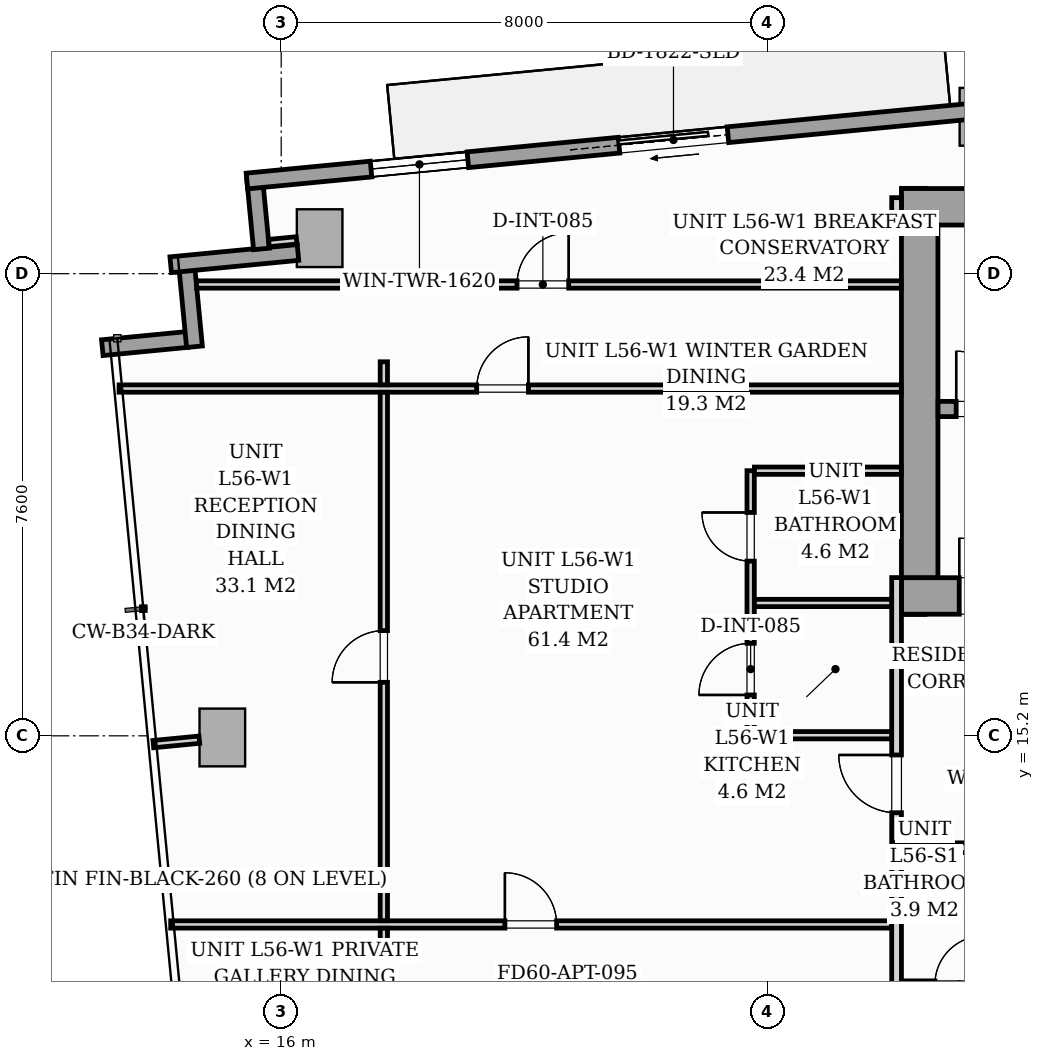
"""IFC4 building model, lengths in metres.
Left out: names, types, materials, properties, quantities, classifications, styles, units other than length and angle.
Written with IfcOpenShell. Run it as: python <this file> out.ifc"""

import sys

from ifc_helpers import new_model, si_unit, direction, frame, frame_2d, origin, origin_2d, place, context, subcontext, project, spatial, rectangle, i_section, extrude, source, transform, mapped, element, fill, save


model = new_model("IFC4")
c1 = context("Model", 3, precision=1e-05, world=origin(), true_north=direction((0.0, 1.0)))
c2 = subcontext(c1, "Body", "Model", "MODEL_VIEW")
j1 = project(units=[si_unit("LENGTHUNIT", "METRE"), si_unit("PLANEANGLEUNIT", "RADIAN")], contexts=[c1])
p1 = place(None, origin())
s1 = spatial("IfcSite", under=j1, at=p1, CompositionType="ELEMENT")
p2 = place(p1, origin())
s2 = spatial("IfcBuilding", under=s1, at=p2, CompositionType="ELEMENT")
p3 = place(p2, frame((0.0, 0.0, 195.4)))
s3 = spatial("IfcBuildingStorey", under=s2, at=p3, CompositionType="ELEMENT", Elevation=195.4)
m1 = source(origin(), c2, "Body", "SweptSolid", [
    extrude(i_section(OverallWidth=0.416, OverallDepth=0.446, WebThickness=0.039, FlangeThickness=0.063, FilletRadius=0.018, at=origin_2d()), origin(), (0.0, 0.0, 1.0), 3.196),
])
for number, where, z_axis, x_axis in (
    (1, (26.4, 17.4, 0.002), (0.0, 0.0, 1.0), (1.0, 0.0, 0.0)),
    (2, (26.4, 24.0, 0.002), (0.0, 0.0, 1.0), (1.0, 0.0, 0.0)),
):
    element("IfcColumn", number, at=place(p3, frame(where, z_axis=z_axis, x_axis=x_axis)), inside=s3, PredefinedType="PILASTER", context=c2, shape_type="MappedRepresentation", body=[
        mapped(m1, transform((0.0, 0.0, 0.0), scale=1.0)),
    ])
m2 = source(origin(), c2, "Body", "SweptSolid", [
    extrude(rectangle(XDim=0.75, YDim=0.95, at=origin_2d()), origin(), (0.0, 0.0, 1.0), 3.196),
])
for number, where, z_axis, x_axis in (
    (3, (16.632, 23.384, 0.002), (0.0, 0.0, 1.0), (0.995, 0.096, 0.0)),
    (4, (27.532, 25.38, 0.002), (0.0, 0.0, 1.0), (0.995, 0.096, 0.0)),
    (5, (15.032, 15.173, 0.002), (0.0, 0.0, 1.0), (0.995, 0.096, 0.0)),
):
    element("IfcColumn", number, at=place(p3, frame(where, z_axis=z_axis, x_axis=x_axis)), inside=s3, PredefinedType="COLUMN", context=c2, shape_type="MappedRepresentation", body=[
        mapped(m2, transform((0.0, 0.0, 0.0), scale=1.0)),
    ])
p4 = place(p3, frame((13.058, 21.583, 0.0), z_axis=(0.0, 0.0, 1.0), x_axis=(0.99540774648, 0.095725744959, 0.0)))
e6 = element("IfcWall", 6, at=p4, inside=s3, PredefinedType="STANDARD", context=c2, shape_type="SweptSolid", body=[
    extrude(rectangle(XDim=1.395, YDim=0.26, at=frame_2d((0.698, 0.0))), origin(), (0.0, 0.0, 1.0), 2.94),
])
p5 = place(p3, frame((14.574, 21.599, 0.0), z_axis=(0.0, 0.0, 1.0), x_axis=(-0.095742423056, 0.99540614245, 0.0)))
e7 = element("IfcWall", 7, at=p5, inside=s3, PredefinedType="STANDARD", context=c2, shape_type="SweptSolid", body=[
    extrude(rectangle(XDim=1.395, YDim=0.26, at=frame_2d((0.697, 0.0))), origin(), (0.0, 0.0, 1.0), 2.94),
])
p6 = place(p3, frame((14.183, 22.947, 0.0), z_axis=(0.0, 0.0, 1.0), x_axis=(0.995401580483, 0.095789840651, 0.0)))
e8 = element("IfcWall", 8, at=p6, inside=s3, PredefinedType="STANDARD", context=c2, shape_type="SweptSolid", body=[
    extrude(rectangle(XDim=2.103, YDim=0.26, at=frame_2d((1.051, 0.0))), origin(), (0.0, 0.0, 1.0), 2.94),
])
p7 = place(p3, frame((15.675, 23.207, 0.0), z_axis=(0.0, 0.0, 1.0), x_axis=(-0.095951054827, 0.995386053287, 0.0)))
e9 = element("IfcWall", 9, at=p7, inside=s3, PredefinedType="STANDARD", context=c2, shape_type="SweptSolid", body=[
    extrude(rectangle(XDim=1.15, YDim=0.26, at=frame_2d((0.575, 0.0))), origin(), (0.0, 0.0, 1.0), 2.94),
])
p8 = place(p3, frame((15.437, 24.324, 0.0), z_axis=(0.0, 0.0, 1.0), x_axis=(0.995395627913, 0.095851676732, 0.0)))
e10 = element("IfcWall", 10, at=p8, inside=s3, PredefinedType="STANDARD", context=c2, shape_type="SweptSolid", body=[
    extrude(rectangle(XDim=16.1, YDim=0.26, at=frame_2d((8.05, 0.0))), origin(), (0.0, 0.0, 1.0), 2.94),
])
p9 = place(p8, frame((6.147, 0.0, 0.0)))
e11 = element("IfcOpeningElement", 11, at=p9, cuts=e10, PredefinedType="OPENING", context=c2, shape_type="SweptSolid", body=[
    extrude(rectangle(XDim=1.8, YDim=2.06, at=frame_2d((0.9, 1.03))), frame((0.0, 0.14, 0.0), z_axis=(0.0, -1.0, 0.0), x_axis=(1.0, 0.0, 0.0)), (0.0, 0.0, 1.0), 0.28),
])
p10 = place(p8, frame((2.05, 0.0, 0.65)))
e12 = element("IfcOpeningElement", 12, at=p10, cuts=e10, PredefinedType="OPENING", context=c2, shape_type="SweptSolid", body=[
    extrude(rectangle(XDim=1.6, YDim=1.5, at=frame_2d((0.8, 0.75))), frame((0.0, 0.14, 0.0), z_axis=(0.0, -1.0, 0.0), x_axis=(1.0, 0.0, 0.0)), (0.0, 0.0, 1.0), 0.28),
])
p11 = place(p3, frame((26.2, 17.5, 0.0), z_axis=(0.0, 0.0, 1.0), x_axis=(1.0, 0.0, 0.0)))
e13 = element("IfcWall", 13, at=p11, inside=s3, PredefinedType="SHEAR", context=c2, shape_type="SweptSolid", body=[
    extrude(rectangle(XDim=19.6, YDim=0.6, at=frame_2d((9.8, 0.0))), origin(), (0.0, 0.0, 1.0), 3.2),
])
p12 = place(p11, frame((0.95, 0.0, 0.0)))
e14 = element("IfcOpeningElement", 14, at=p12, cuts=e13, PredefinedType="OPENING", context=c2, shape_type="SweptSolid", body=[
    extrude(rectangle(XDim=0.95, YDim=2.06, at=frame_2d((0.475, 1.03))), frame((0.0, 0.31, 0.0), z_axis=(0.0, -1.0, 0.0), x_axis=(1.0, 0.0, 0.0)), (0.0, 0.0, 1.0), 0.62),
])
p13 = place(p11, frame((9.38, 0.0, 0.0)))
e15 = element("IfcOpeningElement", 15, at=p13, cuts=e13, PredefinedType="OPENING", context=c2, shape_type="SweptSolid", body=[
    extrude(rectangle(XDim=0.85, YDim=2.0, at=frame_2d((0.425, 1.0))), frame((0.0, 0.31, 0.0), z_axis=(0.0, -1.0, 0.0), x_axis=(1.0, 0.0, 0.0)), (0.0, 0.0, 1.0), 0.62),
])
p14 = place(p11, frame((17.55, 0.0, 0.0)))
e16 = element("IfcOpeningElement", 16, at=p14, cuts=e13, PredefinedType="OPENING", context=c2, shape_type="SweptSolid", body=[
    extrude(rectangle(XDim=0.95, YDim=2.06, at=frame_2d((0.475, 1.03))), frame((0.0, 0.31, 0.0), z_axis=(0.0, -1.0, 0.0), x_axis=(1.0, 0.0, 0.0)), (0.0, 0.0, 1.0), 0.62),
])
p15 = place(p3, frame((26.2, 23.9, 0.0), z_axis=(0.0, 0.0, 1.0), x_axis=(1.0, 0.0, 0.0)))
e17 = element("IfcWall", 17, at=p15, inside=s3, PredefinedType="SHEAR", context=c2, shape_type="SweptSolid", body=[
    extrude(rectangle(XDim=19.6, YDim=0.6, at=frame_2d((9.8, 0.0))), origin(), (0.0, 0.0, 1.0), 3.2),
])
p16 = place(p3, frame((26.5, 17.802, 0.0), z_axis=(0.0, 0.0, 1.0), x_axis=(0.0, 1.0, 0.0)))
e18 = element("IfcWall", 18, at=p16, inside=s3, PredefinedType="SHEAR", context=c2, shape_type="SweptSolid", body=[
    extrude(rectangle(XDim=5.796, YDim=0.6, at=frame_2d((2.898, 0.0))), origin(), (0.0, 0.0, 1.0), 3.2),
])
p17 = place(p3, frame((26.802, 20.575, 0.0), z_axis=(0.0, 0.0, 1.0), x_axis=(1.0, 0.0, 0.0)))
e19 = element("IfcWall", 19, at=p17, inside=s3, PredefinedType="SOLIDWALL", context=c2, shape_type="SweptSolid", body=[
    extrude(rectangle(XDim=8.148, YDim=0.25, at=frame_2d((4.074, 0.0))), origin(), (0.0, 0.0, 1.0), 3.2),
])
p18 = place(p17, frame((0.298, 0.0, 0.0)))
e20 = element("IfcOpeningElement", 20, at=p18, cuts=e19, PredefinedType="OPENING", context=c2, shape_type="SweptSolid", body=[
    extrude(rectangle(XDim=0.95, YDim=2.06, at=frame_2d((0.475, 1.03))), frame((0.0, 0.135, 0.0), z_axis=(0.0, -1.0, 0.0), x_axis=(1.0, 0.0, 0.0)), (0.0, 0.0, 1.0), 0.27),
])
p19 = place(p3, frame((26.12, 13.36, 0.0), z_axis=(0.0, 0.0, 1.0), x_axis=(1.0, 0.0, 0.0)))
e21 = element("IfcWall", 21, at=p19, inside=s3, PredefinedType="PARTITIONING", context=c2, shape_type="SweptSolid", body=[
    extrude(rectangle(XDim=19.76, YDim=0.16, at=frame_2d((9.88, 0.0))), origin(), (0.0, 0.0, 1.0), 2.94),
])
p20 = place(p19, frame((5.221, 0.0, 0.0)))
e22 = element("IfcOpeningElement", 22, at=p20, cuts=e21, PredefinedType="OPENING", context=c2, shape_type="SweptSolid", body=[
    extrude(rectangle(XDim=0.95, YDim=2.06, at=frame_2d((0.475, 1.03))), frame((0.0, 0.09, 0.0), z_axis=(0.0, -1.0, 0.0), x_axis=(1.0, 0.0, 0.0)), (0.0, 0.0, 1.0), 0.18),
])
p21 = place(p19, frame((12.119, 0.0, 0.0)))
e23 = element("IfcOpeningElement", 23, at=p21, cuts=e21, PredefinedType="OPENING", context=c2, shape_type="SweptSolid", body=[
    extrude(rectangle(XDim=0.95, YDim=2.06, at=frame_2d((0.475, 1.03))), frame((0.0, 0.09, 0.0), z_axis=(0.0, -1.0, 0.0), x_axis=(1.0, 0.0, 0.0)), (0.0, 0.0, 1.0), 0.18),
])
p22 = place(p19, frame((14.492, 0.0, 0.0)))
e24 = element("IfcOpeningElement", 24, at=p22, cuts=e21, PredefinedType="OPENING", context=c2, shape_type="SweptSolid", body=[
    extrude(rectangle(XDim=0.95, YDim=2.06, at=frame_2d((0.475, 1.03))), frame((0.0, 0.09, 0.0), z_axis=(0.0, -1.0, 0.0), x_axis=(1.0, 0.0, 0.0)), (0.0, 0.0, 1.0), 0.18),
])
p23 = place(p3, frame((26.12, 7.261, 0.0), z_axis=(0.0, 0.0, 1.0), x_axis=(0.0, 1.0, 0.0)))
e25 = element("IfcWall", 25, at=p23, inside=s3, PredefinedType="PARTITIONING", context=c2, shape_type="SweptSolid", body=[
    extrude(rectangle(XDim=6.017, YDim=0.16, at=frame_2d((3.008, 0.0))), origin(), (0.0, 0.0, 1.0), 2.94),
])
p24 = place(p3, frame((26.12, 13.442, 0.0), z_axis=(0.0, 0.0, 1.0), x_axis=(0.0, 1.0, 0.0)))
e26 = element("IfcWall", 26, at=p24, inside=s3, PredefinedType="PARTITIONING", context=c2, shape_type="SweptSolid", body=[
    extrude(rectangle(XDim=4.36, YDim=0.16, at=frame_2d((2.18, 0.0))), origin(), (0.0, 0.0, 1.0), 2.94),
])
p25 = place(p24, frame((0.493, 0.0, 0.0)))
e27 = element("IfcOpeningElement", 27, at=p25, cuts=e26, PredefinedType="OPENING", context=c2, shape_type="SweptSolid", body=[
    extrude(rectangle(XDim=0.95, YDim=2.06, at=frame_2d((0.475, 1.03))), frame((0.0, 0.09, 0.0), z_axis=(0.0, -1.0, 0.0), x_axis=(1.0, 0.0, 0.0)), (0.0, 0.0, 1.0), 0.18),
])
p26 = place(p3, frame((26.12, 23.598, 0.0), z_axis=(0.0, 0.0, 1.0), x_axis=(0.0, 1.0, 0.0)))
e28 = element("IfcWall", 28, at=p26, inside=s3, PredefinedType="PARTITIONING", context=c2, shape_type="SweptSolid", body=[
    extrude(rectangle(XDim=0.452, YDim=0.16, at=frame_2d((0.226, 0.0))), origin(), (0.0, 0.0, 1.0), 2.94),
])
p27 = place(p3, frame((26.202, 11.11, 0.0), z_axis=(0.0, 0.0, 1.0), x_axis=(1.0, 0.0, 0.0)))
e29 = element("IfcWall", 29, at=p27, inside=s3, PredefinedType="PARTITIONING", context=c2, shape_type="SweptSolid", body=[
    extrude(rectangle(XDim=4.098, YDim=0.12, at=frame_2d((2.049, 0.0))), origin(), (0.0, 0.0, 1.0), 2.94),
])
p28 = place(p27, frame((0.548, 0.0, 0.0)))
e30 = element("IfcOpeningElement", 30, at=p28, cuts=e29, PredefinedType="OPENING", context=c2, shape_type="SweptSolid", body=[
    extrude(rectangle(XDim=0.8, YDim=2.02, at=frame_2d((0.4, 1.01))), frame((0.0, 0.07, 0.0), z_axis=(0.0, -1.0, 0.0), x_axis=(1.0, 0.0, 0.0)), (0.0, 0.0, 1.0), 0.14),
])
p29 = place(p27, frame((2.573, 0.0, 0.0)))
e31 = element("IfcOpeningElement", 31, at=p29, cuts=e29, PredefinedType="OPENING", context=c2, shape_type="SweptSolid", body=[
    extrude(rectangle(XDim=0.85, YDim=2.05, at=frame_2d((0.425, 1.025))), frame((0.0, 0.07, 0.0), z_axis=(0.0, -1.0, 0.0), x_axis=(1.0, 0.0, 0.0)), (0.0, 0.0, 1.0), 0.14),
])
p30 = place(p3, frame((23.72, 15.21, 0.0), z_axis=(0.0, 0.0, 1.0), x_axis=(0.0, 1.0, 0.0)))
e32 = element("IfcWall", 32, at=p30, inside=s3, PredefinedType="PARTITIONING", context=c2, shape_type="SweptSolid", body=[
    extrude(rectangle(XDim=4.35, YDim=0.12, at=frame_2d((2.175, 0.0))), origin(), (0.0, 0.0, 1.0), 2.94),
])
p31 = place(p30, frame((0.662, 0.0, 0.0)))
e33 = element("IfcOpeningElement", 33, at=p31, cuts=e32, PredefinedType="OPENING", context=c2, shape_type="SweptSolid", body=[
    extrude(rectangle(XDim=0.85, YDim=2.05, at=frame_2d((0.425, 1.025))), frame((0.0, 0.07, 0.0), z_axis=(0.0, -1.0, 0.0), x_axis=(1.0, 0.0, 0.0)), (0.0, 0.0, 1.0), 0.14),
])
p32 = place(p30, frame((2.863, 0.0, 0.0)))
e34 = element("IfcOpeningElement", 34, at=p32, cuts=e32, PredefinedType="OPENING", context=c2, shape_type="SweptSolid", body=[
    extrude(rectangle(XDim=0.8, YDim=2.02, at=frame_2d((0.4, 1.01))), frame((0.0, 0.07, 0.0), z_axis=(0.0, -1.0, 0.0), x_axis=(1.0, 0.0, 0.0)), (0.0, 0.0, 1.0), 0.14),
])
p33 = place(p3, frame((23.782, 17.385, 0.0), z_axis=(0.0, 0.0, 1.0), x_axis=(1.0, 0.0, 0.0)))
e35 = element("IfcWall", 35, at=p33, inside=s3, PredefinedType="PARTITIONING", context=c2, shape_type="SweptSolid", body=[
    extrude(rectangle(XDim=2.256, YDim=0.12, at=frame_2d((1.128, 0.0))), origin(), (0.0, 0.0, 1.0), 2.281),
])
p34 = place(p3, frame((23.782, 15.21, 0.0), z_axis=(0.0, 0.0, 1.0), x_axis=(1.0, 0.0, 0.0)))
e36 = element("IfcWall", 36, at=p34, inside=s3, PredefinedType="PARTITIONING", context=c2, shape_type="SweptSolid", body=[
    extrude(rectangle(XDim=2.256, YDim=0.12, at=frame_2d((1.128, 0.0))), origin(), (0.0, 0.0, 1.0), 2.94),
])
p35 = place(p3, frame((23.782, 19.56, 0.0), z_axis=(0.0, 0.0, 1.0), x_axis=(1.0, 0.0, 0.0)))
e37 = element("IfcWall", 37, at=p35, inside=s3, PredefinedType="PARTITIONING", context=c2, shape_type="SweptSolid", body=[
    extrude(rectangle(XDim=2.416, YDim=0.12, at=frame_2d((1.208, 0.0))), origin(), (0.0, 0.0, 1.0), 2.94),
])
p36 = place(p3, frame((14.608, 22.622, 0.0), z_axis=(0.0, 0.0, 1.0), x_axis=(1.0, 0.0, 0.0)))
e38 = element("IfcWall", 38, at=p36, inside=s3, PredefinedType="PARTITIONING", context=c2, shape_type="SweptSolid", body=[
    extrude(rectangle(XDim=11.59, YDim=0.12, at=frame_2d((5.795, 0.0))), origin(), (0.0, 0.0, 1.0), 2.94),
])
p37 = place(p36, frame((5.27, 0.0, 0.0)))
e39 = element("IfcOpeningElement", 39, at=p37, cuts=e38, PredefinedType="OPENING", context=c2, shape_type="SweptSolid", body=[
    extrude(rectangle(XDim=0.85, YDim=2.05, at=frame_2d((0.425, 1.025))), frame((0.0, 0.07, 0.0), z_axis=(0.0, -1.0, 0.0), x_axis=(1.0, 0.0, 0.0)), (0.0, 0.0, 1.0), 0.14),
])
p38 = place(p3, frame((14.183, 12.098, 0.0), z_axis=(0.0, 0.0, 1.0), x_axis=(1.0, 0.0, 0.0)))
e40 = element("IfcWall", 40, at=p38, inside=s3, PredefinedType="PARTITIONING", context=c2, shape_type="SweptSolid", body=[
    extrude(rectangle(XDim=11.855, YDim=0.12, at=frame_2d((5.928, 0.0))), origin(), (0.0, 0.0, 1.0), 2.94),
])
p39 = place(p38, frame((5.496, 0.0, 0.0)))
e41 = element("IfcOpeningElement", 41, at=p39, cuts=e40, PredefinedType="OPENING", context=c2, shape_type="SweptSolid", body=[
    extrude(rectangle(XDim=0.85, YDim=2.05, at=frame_2d((0.425, 1.025))), frame((0.0, 0.07, 0.0), z_axis=(0.0, -1.0, 0.0), x_axis=(1.0, 0.0, 0.0)), (0.0, 0.0, 1.0), 0.14),
])
p40 = place(p3, frame((13.334, 20.911, 0.0), z_axis=(0.0, 0.0, 1.0), x_axis=(1.0, 0.0, 0.0)))
e42 = element("IfcWall", 42, at=p40, inside=s3, PredefinedType="PARTITIONING", context=c2, shape_type="SweptSolid", body=[
    extrude(rectangle(XDim=12.864, YDim=0.12, at=frame_2d((6.432, 0.0))), origin(), (0.0, 0.0, 1.0), 2.94),
])
p41 = place(p40, frame((5.881, 0.0, 0.0)))
e43 = element("IfcOpeningElement", 43, at=p41, cuts=e42, PredefinedType="OPENING", context=c2, shape_type="SweptSolid", body=[
    extrude(rectangle(XDim=0.85, YDim=2.05, at=frame_2d((0.425, 1.025))), frame((0.0, 0.07, 0.0), z_axis=(0.0, -1.0, 0.0), x_axis=(1.0, 0.0, 0.0)), (0.0, 0.0, 1.0), 0.14),
])
p42 = place(p3, frame((17.688, 11.658, 0.0), z_axis=(0.0, 0.0, 1.0), x_axis=(0.0, 1.0, 0.0)))
e44 = element("IfcWall", 44, at=p42, inside=s3, PredefinedType="PARTITIONING", context=c2, shape_type="SweptSolid", body=[
    extrude(rectangle(XDim=0.378, YDim=0.12, at=frame_2d((0.189, 0.0))), origin(), (0.0, 0.0, 1.0), 2.94),
])
p43 = place(p3, frame((17.688, 12.16, 0.0), z_axis=(0.0, 0.0, 1.0), x_axis=(0.0, 1.0, 0.0)))
e45 = element("IfcWall", 45, at=p43, inside=s3, PredefinedType="PARTITIONING", context=c2, shape_type="SweptSolid", body=[
    extrude(rectangle(XDim=8.689, YDim=0.12, at=frame_2d((4.345, 0.0))), origin(), (0.0, 0.0, 1.0), 2.94),
])
p44 = place(p43, frame((3.92, 0.0, 0.0)))
e46 = element("IfcOpeningElement", 46, at=p44, cuts=e45, PredefinedType="OPENING", context=c2, shape_type="SweptSolid", body=[
    extrude(rectangle(XDim=0.85, YDim=2.05, at=frame_2d((0.425, 1.025))), frame((0.0, 0.07, 0.0), z_axis=(0.0, -1.0, 0.0), x_axis=(1.0, 0.0, 0.0)), (0.0, 0.0, 1.0), 0.14),
])
p45 = place(p3, frame((17.688, 20.973, 0.0), z_axis=(0.0, 0.0, 1.0), x_axis=(0.0, 1.0, 0.0)))
e47 = element("IfcWall", 47, at=p45, inside=s3, PredefinedType="PARTITIONING", context=c2, shape_type="SweptSolid", body=[
    extrude(rectangle(XDim=0.378, YDim=0.12, at=frame_2d((0.189, 0.0))), origin(), (0.0, 0.0, 1.0), 2.94),
])
p46 = place(p3, frame((16.254, 23.348, 0.0), z_axis=(0.0, 0.0, 1.0), x_axis=(-0.995389482415, -0.095915474751, 0.0)))
e48 = element("IfcWall", 48, at=p46, inside=s3, PredefinedType="PARTITIONING", context=c2, shape_type="SweptSolid", body=[
    extrude(rectangle(XDim=0.458, YDim=0.12, at=frame_2d((0.229, 0.0))), origin(), (0.0, 0.0, 1.0), 2.94),
])
p47 = place(p3, frame((14.654, 15.136, 0.0), z_axis=(0.0, 0.0, 1.0), x_axis=(-0.995408440582, -0.095718527039, 0.0)))
e49 = element("IfcWall", 49, at=p47, inside=s3, PredefinedType="PARTITIONING", context=c2, shape_type="SweptSolid", body=[
    extrude(rectangle(XDim=0.76, YDim=0.12, at=frame_2d((0.38, 0.0))), origin(), (0.0, 0.0, 1.0), 2.94),
])
m3 = source(origin(), c2, "Body", "SweptSolid", [
    extrude(rectangle(XDim=1.8, YDim=2.06, at=frame_2d((0.9, 1.03))), frame((0.0, 0.025, 0.0), z_axis=(0.0, -1.0, 0.0), x_axis=(1.0, 0.0, 0.0)), (0.0, 0.0, 1.0), 0.05),
])
p48 = place(p9, origin())
e50 = element("IfcDoor", 50, at=p48, inside=s3, OperationType="SLIDING_TO_LEFT", PredefinedType="DOOR", context=c2, shape_type="MappedRepresentation", body=[
    mapped(m3, transform((0.0, 0.0, 0.0), scale=1.0)),
])
fill(e11, e50)
m4 = source(origin(), c2, "Body", "SweptSolid", [
    extrude(rectangle(XDim=1.6, YDim=1.5, at=frame_2d((0.8, 0.75))), frame((0.0, 0.03, 0.0), z_axis=(0.0, -1.0, 0.0), x_axis=(1.0, 0.0, 0.0)), (0.0, 0.0, 1.0), 0.06),
])
p49 = place(p10, origin())
e51 = element("IfcWindow", 51, at=p49, inside=s3, PartitioningType="SINGLE_PANEL", PredefinedType="WINDOW", context=c2, shape_type="MappedRepresentation", body=[
    mapped(m4, transform((0.0, 0.0, 0.0), scale=1.0)),
])
fill(e12, e51)
m5 = source(origin(), c2, "Body", "SweptSolid", [
    extrude(rectangle(XDim=0.95, YDim=2.06, at=frame_2d((0.475, 1.03))), frame((0.0, 0.025, 0.0), z_axis=(0.0, -1.0, 0.0), x_axis=(1.0, 0.0, 0.0)), (0.0, 0.0, 1.0), 0.05),
])
p50 = place(p12, origin())
e52 = element("IfcDoor", 52, at=p50, inside=s3, OperationType="SINGLE_SWING_LEFT", PredefinedType="DOOR", context=c2, shape_type="MappedRepresentation", body=[
    mapped(m5, transform((0.0, 0.0, 0.0), scale=1.0)),
])
fill(e14, e52)
p51 = place(p18, origin())
e53 = element("IfcDoor", 53, at=p51, inside=s3, OperationType="SINGLE_SWING_LEFT", PredefinedType="DOOR", context=c2, shape_type="MappedRepresentation", body=[
    mapped(m5, transform((0.0, 0.0, 0.0), scale=1.0)),
])
fill(e20, e53)
m6 = source(origin(), c2, "Body", "SweptSolid", [
    extrude(rectangle(XDim=0.95, YDim=2.06, at=frame_2d((0.475, 1.03))), frame((0.0, 0.025, 0.0), z_axis=(0.0, -1.0, 0.0), x_axis=(1.0, 0.0, 0.0)), (0.0, 0.0, 1.0), 0.05),
])
p52 = place(p25, origin())
e54 = element("IfcDoor", 54, at=p52, inside=s3, OperationType="SINGLE_SWING_RIGHT", PredefinedType="DOOR", context=c2, shape_type="MappedRepresentation", body=[
    mapped(m6, transform((0.0, 0.0, 0.0), scale=1.0)),
])
fill(e27, e54)
m7 = source(origin(), c2, "Body", "SweptSolid", [
    extrude(rectangle(XDim=0.85, YDim=2.05, at=frame_2d((0.425, 1.025))), frame((0.0, 0.025, 0.0), z_axis=(0.0, -1.0, 0.0), x_axis=(1.0, 0.0, 0.0)), (0.0, 0.0, 1.0), 0.05),
])
p53 = place(p31, origin())
e55 = element("IfcDoor", 55, at=p53, inside=s3, OperationType="SINGLE_SWING_LEFT", PredefinedType="DOOR", context=c2, shape_type="MappedRepresentation", body=[
    mapped(m7, transform((0.0, 0.0, 0.0), scale=1.0)),
])
fill(e33, e55)
m8 = source(origin(), c2, "Body", "SweptSolid", [
    extrude(rectangle(XDim=0.8, YDim=2.02, at=frame_2d((0.4, 1.01))), frame((0.0, 0.025, 0.0), z_axis=(0.0, -1.0, 0.0), x_axis=(1.0, 0.0, 0.0)), (0.0, 0.0, 1.0), 0.05),
])
p54 = place(p32, origin())
e56 = element("IfcDoor", 56, at=p54, inside=s3, OperationType="SINGLE_SWING_RIGHT", PredefinedType="DOOR", context=c2, shape_type="MappedRepresentation", body=[
    mapped(m8, transform((0.0, 0.0, 0.0), scale=1.0)),
])
fill(e34, e56)
p55 = place(p37, origin())
e57 = element("IfcDoor", 57, at=p55, inside=s3, OperationType="SINGLE_SWING_RIGHT", PredefinedType="DOOR", context=c2, shape_type="MappedRepresentation", body=[
    mapped(m7, transform((0.0, 0.0, 0.0), scale=1.0)),
])
fill(e39, e57)
p56 = place(p39, origin())
e58 = element("IfcDoor", 58, at=p56, inside=s3, OperationType="SINGLE_SWING_LEFT", PredefinedType="DOOR", context=c2, shape_type="MappedRepresentation", body=[
    mapped(m7, transform((0.0, 0.0, 0.0), scale=1.0)),
])
fill(e41, e58)
p57 = place(p41, origin())
e59 = element("IfcDoor", 59, at=p57, inside=s3, OperationType="SINGLE_SWING_RIGHT", PredefinedType="DOOR", context=c2, shape_type="MappedRepresentation", body=[
    mapped(m7, transform((0.0, 0.0, 0.0), scale=1.0)),
])
fill(e43, e59)
p58 = place(p44, origin())
e60 = element("IfcDoor", 60, at=p58, inside=s3, OperationType="SINGLE_SWING_LEFT", PredefinedType="DOOR", context=c2, shape_type="MappedRepresentation", body=[
    mapped(m7, transform((0.0, 0.0, 0.0), scale=1.0)),
])
fill(e46, e60)
save(model, sys.argv[1])
